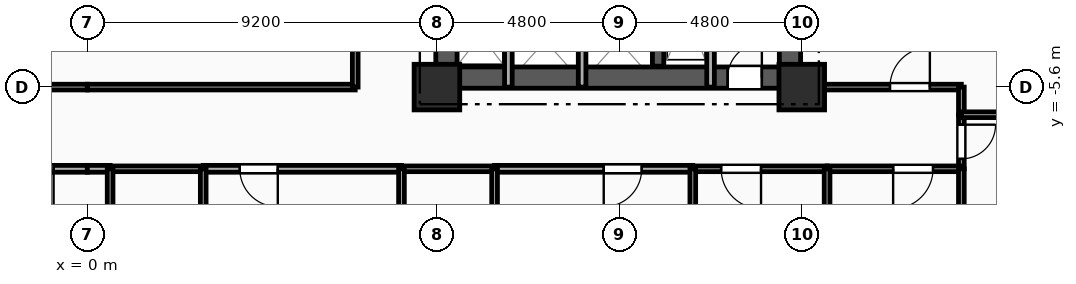
"""IFC4 building model, lengths in metres.
Left out: names, types, materials, properties, quantities, classifications, styles, units other than length and angle.
Written with IfcOpenShell. Run it as: python <this file> out.ifc"""

import sys

from ifc_helpers import new_model, si_unit, direction, frame, frame_2d, origin, origin_2d, place, context, subcontext, project, spatial, rectangle, extrude, element, fill, save


model = new_model("IFC4")
c1 = context("Model", 3, precision=1e-05, world=origin(), true_north=direction((0.0, 1.0)))
c2 = subcontext(c1, "Body", "Model", "MODEL_VIEW")
j1 = project(units=[si_unit("LENGTHUNIT", "METRE"), si_unit("PLANEANGLEUNIT", "RADIAN")], contexts=[c1])
p1 = place(None, origin())
s1 = spatial("IfcSite", under=j1, at=p1, CompositionType="ELEMENT")
p2 = place(p1, origin())
s2 = spatial("IfcBuilding", under=s1, at=p2, CompositionType="ELEMENT")
p3 = place(p2, frame((0.0, 0.0, 40.4)))
s3 = spatial("IfcBuildingStorey", under=s2, at=p3, CompositionType="ELEMENT", Elevation=40.4)
for number, where, z_axis, x_axis in (
    (1, (9.2, -5.6, 0.0), (0.0, 0.0, 1.0), (1.0, 0.0, 0.0)),
    (2, (18.8, -5.6, 0.0), (0.0, 0.0, 1.0), (1.0, 0.0, 0.0)),
):
    element("IfcColumn", number, at=place(p3, frame(where, z_axis=z_axis, x_axis=x_axis)), inside=s3, PredefinedType="COLUMN", context=c2, shape_type="SweptSolid", body=[
        extrude(rectangle(XDim=1.2, YDim=1.2, at=origin_2d()), origin(), (0.0, 0.0, 1.0), 3.35),
    ])
p4 = place(p3, frame((9.2, -5.35, 0.0), z_axis=(0.0, 0.0, 1.0), x_axis=(1.0, 0.0, 0.0)))
e3 = element("IfcWall", 3, at=p4, inside=s3, PredefinedType="SHEAR", context=c2, shape_type="SweptSolid", body=[
    extrude(rectangle(XDim=9.6, YDim=0.56, at=frame_2d((4.8, 0.0))), origin(), (0.0, 0.0, 1.0), 3.035),
])
p5 = place(p4, frame((7.65, 0.0, 0.0)))
e4 = element("IfcOpeningElement", 4, at=p5, cuts=e3, PredefinedType="OPENING", context=c2, shape_type="SweptSolid", body=[
    extrude(rectangle(XDim=0.9, YDim=2.1, at=frame_2d((0.45, 1.05))), frame((0.0, 0.29, 0.0), z_axis=(0.0, -1.0, 0.0), x_axis=(1.0, 0.0, 0.0)), (0.0, 0.0, 1.0), 0.58),
])
p6 = place(p3, frame((9.45, -5.05, 0.0), z_axis=(0.0, 0.0, 1.0), x_axis=(0.0, 1.0, 0.0)))
e5 = element("IfcWall", 5, at=p6, inside=s3, PredefinedType="SHEAR", context=c2, shape_type="SweptSolid", body=[
    extrude(rectangle(XDim=10.1, YDim=0.56, at=frame_2d((5.05, 0.0))), origin(), (0.0, 0.0, 1.0), 3.035),
])
p7 = place(p6, frame((7.15, 0.0, 0.0)))
e6 = element("IfcOpeningElement", 6, at=p7, cuts=e5, PredefinedType="OPENING", context=c2, shape_type="SweptSolid", body=[
    extrude(rectangle(XDim=0.9, YDim=2.1, at=frame_2d((0.45, 1.05))), frame((0.0, 0.29, 0.0), z_axis=(0.0, -1.0, 0.0), x_axis=(1.0, 0.0, 0.0)), (0.0, 0.0, 1.0), 0.58),
])
p8 = place(p6, frame((2.4, 0.0, 0.0)))
e7 = element("IfcOpeningElement", 7, at=p8, cuts=e5, PredefinedType="OPENING", context=c2, shape_type="SweptSolid", body=[
    extrude(rectangle(XDim=1.2, YDim=2.15, at=frame_2d((0.6, 1.075))), frame((0.0, 0.29, 0.0), z_axis=(0.0, -1.0, 0.0), x_axis=(1.0, 0.0, 0.0)), (0.0, 0.0, 1.0), 0.58),
])
p9 = place(p3, frame((18.49, -5.05, 0.0), z_axis=(0.0, 0.0, 1.0), x_axis=(0.0, 1.0, 0.0)))
e8 = element("IfcWall", 8, at=p9, inside=s3, PredefinedType="SHEAR", context=c2, shape_type="SweptSolid", body=[
    extrude(rectangle(XDim=10.1, YDim=0.56, at=frame_2d((5.05, 0.0))), origin(), (0.0, 0.0, 1.0), 3.035),
])
p10 = place(p3, frame((15.02, -5.05, 0.0), z_axis=(0.0, 0.0, 1.0), x_axis=(0.0, 1.0, 0.0)))
e9 = element("IfcWall", 9, at=p10, inside=s3, PredefinedType="SHEAR", context=c2, shape_type="SweptSolid", body=[
    extrude(rectangle(XDim=10.1, YDim=0.3, at=frame_2d((5.05, 0.0))), origin(), (0.0, 0.0, 1.0), 3.035),
])
p11 = place(p3, frame((16.4, -2.11, 0.0), z_axis=(0.0, 0.0, 1.0), x_axis=(0.0, -1.0, 0.0)))
e10 = element("IfcWall", 10, at=p11, inside=s3, PredefinedType="PARTITIONING", context=c2, shape_type="SweptSolid", body=[
    extrude(rectangle(XDim=3.49, YDim=0.2, at=frame_2d((1.745, 0.0))), origin(), (0.0, 0.0, 1.0), 3.035),
])
for number, where, z_axis, x_axis in (
    (11, (11.08, -5.6, 0.0), (0.0, 0.0, 1.0), (0.0, 1.0, 0.0)),
    (12, (13.02, -5.6, 0.0), (0.0, 0.0, 1.0), (0.0, 1.0, 0.0)),
):
    element("IfcWall", number, at=place(p3, frame(where, z_axis=z_axis, x_axis=x_axis)), inside=s3, PredefinedType="PARTITIONING", context=c2, shape_type="SweptSolid", body=[
        extrude(rectangle(XDim=2.25, YDim=0.2, at=frame_2d((1.125, 0.0))), origin(), (0.0, 0.0, 1.0), 3.035),
    ])
p12 = place(p3, frame((0.0, -7.75, 0.0), z_axis=(0.0, 0.0, 1.0), x_axis=(-1.0, 0.0, 0.0)))
e13 = element("IfcWall", 13, at=p12, inside=s3, PredefinedType="PARTITIONING", context=c2, shape_type="SweptSolid", body=[
    extrude(rectangle(XDim=4.617, YDim=0.18, at=frame_2d((2.309, 0.0))), origin(), (0.0, 0.0, 1.0), 3.035),
])
p13 = place(p12, frame((0.887, 0.0, 0.0)))
e14 = element("IfcOpeningElement", 14, at=p13, cuts=e13, PredefinedType="OPENING", context=c2, shape_type="SweptSolid", body=[
    extrude(rectangle(XDim=1.0, YDim=2.15, at=frame_2d((0.5, 1.075))), frame((0.0, 0.1, 0.0), z_axis=(0.0, -1.0, 0.0), x_axis=(1.0, 0.0, 0.0)), (0.0, 0.0, 1.0), 0.2),
])
p14 = place(p3, frame((-7.05, -5.6, 0.0), z_axis=(0.0, 0.0, 1.0), x_axis=(1.0, 0.0, 0.0)))
e15 = element("IfcWall", 15, at=p14, inside=s3, PredefinedType="PARTITIONING", context=c2, shape_type="SweptSolid", body=[
    extrude(rectangle(XDim=7.05, YDim=0.15, at=frame_2d((3.525, 0.0))), origin(), (0.0, 0.0, 1.0), 2.52),
])
p15 = place(p14, frame((4.815, 0.0, 0.0)))
e16 = element("IfcOpeningElement", 16, at=p15, cuts=e15, PredefinedType="OPENING", context=c2, shape_type="SweptSolid", body=[
    extrude(rectangle(XDim=1.05, YDim=2.15, at=frame_2d((0.525, 1.075))), frame((0.0, 0.085, 0.0), z_axis=(0.0, -1.0, 0.0), x_axis=(1.0, 0.0, 0.0)), (0.0, 0.0, 1.0), 0.17),
])
p16 = place(p3, frame((23.0, -6.327, 0.0), z_axis=(0.0, 0.0, 1.0), x_axis=(0.0, -1.0, 0.0)))
e17 = element("IfcWall", 17, at=p16, inside=s3, PredefinedType="PARTITIONING", context=c2, shape_type="SweptSolid", body=[
    extrude(rectangle(XDim=1.423, YDim=0.15, at=frame_2d((0.711, 0.0))), origin(), (0.0, 0.0, 1.0), 3.035),
])
p17 = place(p16, frame((0.261, 0.0, 0.0)))
e18 = element("IfcOpeningElement", 18, at=p17, cuts=e17, PredefinedType="OPENING", context=c2, shape_type="SweptSolid", body=[
    extrude(rectangle(XDim=0.9, YDim=2.1, at=frame_2d((0.45, 1.05))), frame((0.0, 0.085, 0.0), z_axis=(0.0, -1.0, 0.0), x_axis=(1.0, 0.0, 0.0)), (0.0, 0.0, 1.0), 0.17),
])
p18 = place(p3, frame((18.8, -5.6, 0.0), z_axis=(0.0, 0.0, 1.0), x_axis=(1.0, 0.0, 0.0)))
e19 = element("IfcWall", 19, at=p18, inside=s3, PredefinedType="PARTITIONING", context=c2, shape_type="SweptSolid", body=[
    extrude(rectangle(XDim=4.2, YDim=0.15, at=frame_2d((2.1, 0.0))), origin(), (0.0, 0.0, 1.0), 3.035),
])
p19 = place(p18, frame((2.321, 0.0, 0.0)))
e20 = element("IfcOpeningElement", 20, at=p19, cuts=e19, PredefinedType="OPENING", context=c2, shape_type="SweptSolid", body=[
    extrude(rectangle(XDim=1.05, YDim=2.15, at=frame_2d((0.525, 1.075))), frame((0.0, 0.085, 0.0), z_axis=(0.0, -1.0, 0.0), x_axis=(1.0, 0.0, 0.0)), (0.0, 0.0, 1.0), 0.17),
])
p20 = place(p3, frame((23.0, -5.6, 0.0), z_axis=(0.0, 0.0, 1.0), x_axis=(0.0, -1.0, 0.0)))
e21 = element("IfcWall", 21, at=p20, inside=s3, PredefinedType="PARTITIONING", context=c2, shape_type="SweptSolid", body=[
    extrude(rectangle(XDim=0.727, YDim=0.15, at=frame_2d((0.363, 0.0))), origin(), (0.0, 0.0, 1.0), 3.035),
])
p21 = place(p3, frame((0.6, -7.75, 0.0), z_axis=(0.0, 0.0, 1.0), x_axis=(-1.0, 0.0, 0.0)))
e22 = element("IfcWall", 22, at=p21, inside=s3, PredefinedType="PARTITIONING", context=c2, shape_type="SweptSolid", body=[
    extrude(rectangle(XDim=0.6, YDim=0.18, at=frame_2d((0.3, 0.0))), origin(), (0.0, 0.0, 1.0), 3.035),
])
p22 = place(p3, frame((8.267, -7.75, 0.0), z_axis=(0.0, 0.0, 1.0), x_axis=(-1.0, 0.0, 0.0)))
e23 = element("IfcWall", 23, at=p22, inside=s3, PredefinedType="PARTITIONING", context=c2, shape_type="SweptSolid", body=[
    extrude(rectangle(XDim=5.217, YDim=0.18, at=frame_2d((2.608, 0.0))), origin(), (0.0, 0.0, 1.0), 3.035),
])
p23 = place(p22, frame((3.255, 0.0, 0.0)))
e24 = element("IfcOpeningElement", 24, at=p23, cuts=e23, PredefinedType="OPENING", context=c2, shape_type="SweptSolid", body=[
    extrude(rectangle(XDim=1.0, YDim=2.15, at=frame_2d((0.5, 1.075))), frame((0.0, 0.1, 0.0), z_axis=(0.0, -1.0, 0.0), x_axis=(1.0, 0.0, 0.0)), (0.0, 0.0, 1.0), 0.2),
])
p24 = place(p3, frame((3.05, -7.75, 0.0), z_axis=(0.0, 0.0, 1.0), x_axis=(-1.0, 0.0, 0.0)))
e25 = element("IfcWall", 25, at=p24, inside=s3, PredefinedType="PLUMBINGWALL", context=c2, shape_type="SweptSolid", body=[
    extrude(rectangle(XDim=2.45, YDim=0.15, at=frame_2d((1.225, 0.0))), origin(), (0.0, 0.0, 1.0), 3.035),
])
p25 = place(p3, frame((15.933, -7.75, 0.0), z_axis=(0.0, 0.0, 1.0), x_axis=(-1.0, 0.0, 0.0)))
e26 = element("IfcWall", 26, at=p25, inside=s3, PredefinedType="PARTITIONING", context=c2, shape_type="SweptSolid", body=[
    extrude(rectangle(XDim=5.216, YDim=0.18, at=frame_2d((2.608, 0.0))), origin(), (0.0, 0.0, 1.0), 3.035),
])
p26 = place(p25, frame((1.344, 0.0, 0.0)))
e27 = element("IfcOpeningElement", 27, at=p26, cuts=e26, PredefinedType="OPENING", context=c2, shape_type="SweptSolid", body=[
    extrude(rectangle(XDim=1.0, YDim=2.15, at=frame_2d((0.5, 1.075))), frame((0.0, 0.1, 0.0), z_axis=(0.0, -1.0, 0.0), x_axis=(1.0, 0.0, 0.0)), (0.0, 0.0, 1.0), 0.2),
])
p27 = place(p3, frame((10.717, -7.75, 0.0), z_axis=(0.0, 0.0, 1.0), x_axis=(-1.0, 0.0, 0.0)))
e28 = element("IfcWall", 28, at=p27, inside=s3, PredefinedType="PLUMBINGWALL", context=c2, shape_type="SweptSolid", body=[
    extrude(rectangle(XDim=2.45, YDim=0.15, at=frame_2d((1.225, 0.0))), origin(), (0.0, 0.0, 1.0), 3.035),
])
p28 = place(p3, frame((19.467, -7.75, 0.0), z_axis=(0.0, 0.0, 1.0), x_axis=(-1.0, 0.0, 0.0)))
e29 = element("IfcWall", 29, at=p28, inside=s3, PredefinedType="PARTITIONING", context=c2, shape_type="SweptSolid", body=[
    extrude(rectangle(XDim=3.533, YDim=0.15, at=frame_2d((1.767, 0.0))), origin(), (0.0, 0.0, 1.0), 3.035),
])
p29 = place(p28, frame((1.738, 0.0, 0.0)))
e30 = element("IfcOpeningElement", 30, at=p29, cuts=e29, PredefinedType="OPENING", context=c2, shape_type="SweptSolid", body=[
    extrude(rectangle(XDim=1.05, YDim=2.15, at=frame_2d((0.525, 1.075))), frame((0.0, 0.085, 0.0), z_axis=(0.0, -1.0, 0.0), x_axis=(1.0, 0.0, 0.0)), (0.0, 0.0, 1.0), 0.17),
])
p30 = place(p3, frame((23.0, -7.75, 0.0), z_axis=(0.0, 0.0, 1.0), x_axis=(-1.0, 0.0, 0.0)))
e31 = element("IfcWall", 31, at=p30, inside=s3, PredefinedType="PARTITIONING", context=c2, shape_type="SweptSolid", body=[
    extrude(rectangle(XDim=3.533, YDim=0.15, at=frame_2d((1.767, 0.0))), origin(), (0.0, 0.0, 1.0), 3.035),
])
p31 = place(p30, frame((0.745, 0.0, 0.0)))
e32 = element("IfcOpeningElement", 32, at=p31, cuts=e31, PredefinedType="OPENING", context=c2, shape_type="SweptSolid", body=[
    extrude(rectangle(XDim=1.05, YDim=2.15, at=frame_2d((0.525, 1.075))), frame((0.0, 0.085, 0.0), z_axis=(0.0, -1.0, 0.0), x_axis=(1.0, 0.0, 0.0)), (0.0, 0.0, 1.0), 0.17),
])
p32 = place(p3, frame((0.0, -5.6, 0.0), z_axis=(0.0, 0.0, 1.0), x_axis=(1.0, 0.0, 0.0)))
e33 = element("IfcWall", 33, at=p32, inside=s3, PredefinedType="PARTITIONING", context=c2, shape_type="SweptSolid", body=[
    extrude(rectangle(XDim=7.05, YDim=0.15, at=frame_2d((3.525, 0.0))), origin(), (0.0, 0.0, 1.0), 2.52),
])
p33 = place(p3, frame((7.05, -5.6, 0.0), z_axis=(0.0, 0.0, 1.0), x_axis=(0.0, 1.0, 0.0)))
e34 = element("IfcWall", 34, at=p33, inside=s3, PredefinedType="PARTITIONING", context=c2, shape_type="SweptSolid", body=[
    extrude(rectangle(XDim=7.05, YDim=0.15, at=frame_2d((3.525, 0.0))), origin(), (0.0, 0.0, 1.0), 3.035),
])
p34 = place(p3, frame((23.0, -6.327, 0.0), z_axis=(0.0, 0.0, 1.0), x_axis=(1.0, 0.0, 0.0)))
e35 = element("IfcWall", 35, at=p34, inside=s3, PredefinedType="PARTITIONING", context=c2, shape_type="SweptSolid", body=[
    extrude(rectangle(XDim=2.59, YDim=0.15, at=frame_2d((1.295, 0.0))), origin(), (0.0, 0.0, 1.0), 3.035),
])
p35 = place(p3, frame((23.0, -19.4, 0.0), z_axis=(0.0, 0.0, 1.0), x_axis=(0.0, 1.0, 0.0)))
e36 = element("IfcWall", 36, at=p35, inside=s3, PredefinedType="PARTITIONING", context=c2, shape_type="SweptSolid", body=[
    extrude(rectangle(XDim=11.65, YDim=0.15, at=frame_2d((5.825, 0.0))), origin(), (0.0, 0.0, 1.0), 3.035),
])
for number, where, z_axis, x_axis in (
    (37, (0.6, -7.75, 0.0), (0.0, 0.0, 1.0), (0.0, -1.0, 0.0)),
    (38, (3.05, -9.9, 0.0), (0.0, 0.0, 1.0), (0.0, 1.0, 0.0)),
    (39, (8.267, -7.75, 0.0), (0.0, 0.0, 1.0), (0.0, -1.0, 0.0)),
    (40, (10.717, -9.9, 0.0), (0.0, 0.0, 1.0), (0.0, 1.0, 0.0)),
):
    element("IfcWall", number, at=place(p3, frame(where, z_axis=z_axis, x_axis=x_axis)), inside=s3, PredefinedType="PLUMBINGWALL", context=c2, shape_type="SweptSolid", body=[
        extrude(rectangle(XDim=2.15, YDim=0.15, at=frame_2d((1.075, 0.0))), origin(), (0.0, 0.0, 1.0), 3.035),
    ])
for number, where, z_axis, x_axis in (
    (41, (15.933, -7.75, 0.0), (0.0, 0.0, 1.0), (0.0, -1.0, 0.0)),
    (42, (19.467, -7.75, 0.0), (0.0, 0.0, 1.0), (0.0, -1.0, 0.0)),
):
    element("IfcWall", number, at=place(p3, frame(where, z_axis=z_axis, x_axis=x_axis)), inside=s3, PredefinedType="PARTITIONING", context=c2, shape_type="SweptSolid", body=[
        extrude(rectangle(XDim=11.65, YDim=0.15, at=frame_2d((5.825, 0.0))), origin(), (0.0, 0.0, 1.0), 3.035),
    ])
p36 = place(p5, origin())
e43 = element("IfcDoor", 43, at=p36, inside=s3, OperationType="SINGLE_SWING_RIGHT", PredefinedType="DOOR", context=c2, shape_type="SweptSolid", body=[
    extrude(rectangle(XDim=0.9, YDim=2.1, at=frame_2d((0.45, 1.05))), frame((0.0, 0.025, 0.0), z_axis=(0.0, -1.0, 0.0), x_axis=(1.0, 0.0, 0.0)), (0.0, 0.0, 1.0), 0.05),
])
fill(e4, e43)
p37 = place(p13, origin())
e44 = element("IfcDoor", 44, at=p37, inside=s3, OperationType="SINGLE_SWING_LEFT", PredefinedType="DOOR", context=c2, shape_type="SweptSolid", body=[
    extrude(rectangle(XDim=1.0, YDim=2.15, at=frame_2d((0.5, 1.075))), frame((0.0, 0.025, 0.0), z_axis=(0.0, -1.0, 0.0), x_axis=(1.0, 0.0, 0.0)), (0.0, 0.0, 1.0), 0.05),
])
fill(e14, e44)
p38 = place(p17, origin())
e45 = element("IfcDoor", 45, at=p38, inside=s3, OperationType="SINGLE_SWING_LEFT", PredefinedType="DOOR", context=c2, shape_type="SweptSolid", body=[
    extrude(rectangle(XDim=0.9, YDim=2.1, at=frame_2d((0.45, 1.05))), frame((0.0, 0.025, 0.0), z_axis=(0.0, -1.0, 0.0), x_axis=(1.0, 0.0, 0.0)), (0.0, 0.0, 1.0), 0.05),
])
fill(e18, e45)
p39 = place(p19, origin())
e46 = element("IfcDoor", 46, at=p39, inside=s3, OperationType="SINGLE_SWING_RIGHT", PredefinedType="DOOR", context=c2, shape_type="SweptSolid", body=[
    extrude(rectangle(XDim=1.05, YDim=2.15, at=frame_2d((0.525, 1.075))), frame((0.0, 0.025, 0.0), z_axis=(0.0, -1.0, 0.0), x_axis=(1.0, 0.0, 0.0)), (0.0, 0.0, 1.0), 0.05),
])
fill(e20, e46)
p40 = place(p23, origin())
e47 = element("IfcDoor", 47, at=p40, inside=s3, OperationType="SINGLE_SWING_LEFT", PredefinedType="DOOR", context=c2, shape_type="SweptSolid", body=[
    extrude(rectangle(XDim=1.0, YDim=2.15, at=frame_2d((0.5, 1.075))), frame((0.0, 0.025, 0.0), z_axis=(0.0, -1.0, 0.0), x_axis=(1.0, 0.0, 0.0)), (0.0, 0.0, 1.0), 0.05),
])
fill(e24, e47)
p41 = place(p26, origin())
e48 = element("IfcDoor", 48, at=p41, inside=s3, OperationType="SINGLE_SWING_RIGHT", PredefinedType="DOOR", context=c2, shape_type="SweptSolid", body=[
    extrude(rectangle(XDim=1.0, YDim=2.15, at=frame_2d((0.5, 1.075))), frame((0.0, 0.025, 0.0), z_axis=(0.0, -1.0, 0.0), x_axis=(1.0, 0.0, 0.0)), (0.0, 0.0, 1.0), 0.05),
])
fill(e27, e48)
p42 = place(p29, origin())
e49 = element("IfcDoor", 49, at=p42, inside=s3, OperationType="SINGLE_SWING_LEFT", PredefinedType="DOOR", context=c2, shape_type="SweptSolid", body=[
    extrude(rectangle(XDim=1.05, YDim=2.15, at=frame_2d((0.525, 1.075))), frame((0.0, 0.025, 0.0), z_axis=(0.0, -1.0, 0.0), x_axis=(1.0, 0.0, 0.0)), (0.0, 0.0, 1.0), 0.05),
])
fill(e30, e49)
p43 = place(p31, origin())
e50 = element("IfcDoor", 50, at=p43, inside=s3, OperationType="SINGLE_SWING_RIGHT", PredefinedType="DOOR", context=c2, shape_type="SweptSolid", body=[
    extrude(rectangle(XDim=1.05, YDim=2.15, at=frame_2d((0.525, 1.075))), frame((0.0, 0.025, 0.0), z_axis=(0.0, -1.0, 0.0), x_axis=(1.0, 0.0, 0.0)), (0.0, 0.0, 1.0), 0.05),
])
fill(e32, e50)
save(model, sys.argv[1])
